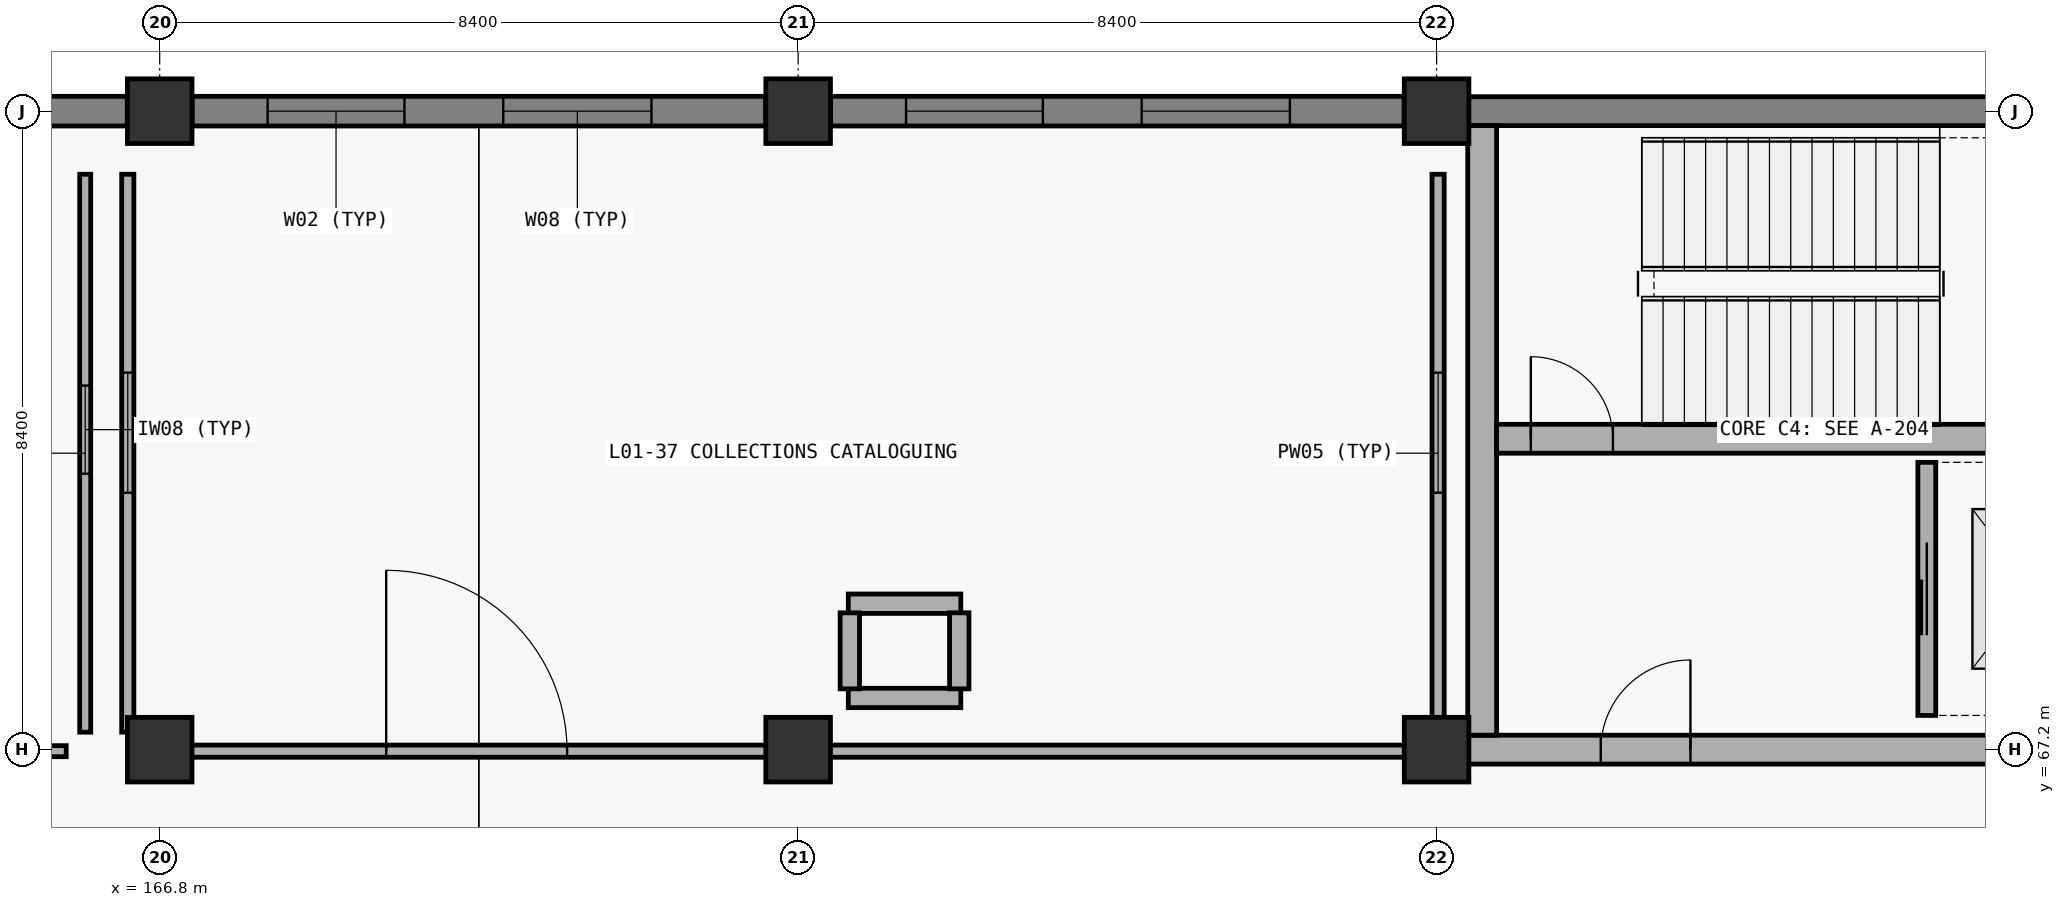
"""IFC4 building model, lengths in metres.
Left out: names, types, materials, properties, quantities, classifications, styles, units other than length and angle.
Written with IfcOpenShell. Run it as: python <this file> out.ifc"""

import sys

from ifc_helpers import new_model, si_unit, direction, frame, frame_2d, origin, origin_2d, place, context, subcontext, project, spatial, rectangle, extrude, element, fill, save


model = new_model("IFC4")
c1 = context("Model", 3, precision=1e-05, world=origin(), true_north=direction((0.0, 1.0)))
c2 = subcontext(c1, "Body", "Model", "MODEL_VIEW")
j1 = project(units=[si_unit("LENGTHUNIT", "METRE"), si_unit("PLANEANGLEUNIT", "RADIAN")], contexts=[c1])
p1 = place(None, origin())
s1 = spatial("IfcSite", under=j1, at=p1, CompositionType="ELEMENT")
p2 = place(p1, origin())
s2 = spatial("IfcBuilding", under=s1, at=p2, CompositionType="ELEMENT")
p3 = place(p2, frame((0.0, 0.0, 5.4)))
s3 = spatial("IfcBuildingStorey", under=s2, at=p3, CompositionType="ELEMENT", Elevation=5.4)
for number, where, z_axis, x_axis in (
    (1, (166.8, 67.2, 0.0), (0.0, 0.0, 1.0), (1.0, 0.0, 0.0)),
    (2, (166.8, 75.6, 0.0), (0.0, 0.0, 1.0), (1.0, 0.0, 0.0)),
    (3, (175.2, 67.2, 0.0), (0.0, 0.0, 1.0), (1.0, 0.0, 0.0)),
    (4, (175.2, 75.6, 0.0), (0.0, 0.0, 1.0), (1.0, 0.0, 0.0)),
    (5, (183.6, 67.2, 0.0), (0.0, 0.0, 1.0), (1.0, 0.0, 0.0)),
    (6, (183.6, 75.6, 0.0), (0.0, 0.0, 1.0), (1.0, 0.0, 0.0)),
):
    element("IfcColumn", number, at=place(p3, frame(where, z_axis=z_axis, x_axis=x_axis)), inside=s3, PredefinedType="COLUMN", context=c2, shape_type="SweptSolid", body=[
        extrude(rectangle(XDim=0.85, YDim=0.85, at=origin_2d()), origin(), (0.0, 0.0, 1.0), 5.1),
    ])
p4 = place(p3, frame((184.01, 67.2, 0.0), z_axis=(0.0, 0.0, 1.0), x_axis=(1.0, 0.0, 0.0)))
e7 = element("IfcWall", 7, at=p4, inside=s3, PredefinedType="SHEAR", context=c2, shape_type="SweptSolid", body=[
    extrude(rectangle(XDim=9.38, YDim=0.38, at=frame_2d((4.69, 0.0))), origin(), (0.0, 0.0, 1.0), 5.1),
])
p5 = place(p4, frame((1.75, 0.0, 0.0)))
e8 = element("IfcOpeningElement", 8, at=p5, cuts=e7, PredefinedType="OPENING", context=c2, shape_type="SweptSolid", body=[
    extrude(rectangle(XDim=1.18, YDim=2.24, at=frame_2d((0.59, 1.12))), frame((0.0, 0.2, 0.0), z_axis=(0.0, -1.0, 0.0), x_axis=(1.0, 0.0, 0.0)), (0.0, 0.0, 1.0), 0.4),
])
p6 = place(p3, frame((184.01, 75.6, 0.0), z_axis=(0.0, 0.0, 1.0), x_axis=(1.0, 0.0, 0.0)))
e9 = element("IfcWall", 9, at=p6, inside=s3, PredefinedType="SHEAR", context=c2, shape_type="SweptSolid", body=[
    extrude(rectangle(XDim=9.38, YDim=0.38, at=frame_2d((4.69, 0.0))), origin(), (0.0, 0.0, 1.0), 5.1),
])
p7 = place(p3, frame((184.2, 67.39, 0.0), z_axis=(0.0, 0.0, 1.0), x_axis=(0.0, 1.0, 0.0)))
e10 = element("IfcWall", 10, at=p7, inside=s3, PredefinedType="SHEAR", context=c2, shape_type="SweptSolid", body=[
    extrude(rectangle(XDim=8.02, YDim=0.38, at=frame_2d((4.01, 0.0))), origin(), (0.0, 0.0, 1.0), 5.1),
])
p8 = place(p3, frame((184.39, 71.29, 0.0), z_axis=(0.0, 0.0, 1.0), x_axis=(1.0, 0.0, 0.0)))
e11 = element("IfcWall", 11, at=p8, inside=s3, PredefinedType="SHEAR", context=c2, shape_type="SweptSolid", body=[
    extrude(rectangle(XDim=8.62, YDim=0.38, at=frame_2d((4.31, 0.0))), origin(), (0.0, 0.0, 1.0), 5.1),
])
p9 = place(p8, frame((0.45, 0.0, 0.0)))
e12 = element("IfcOpeningElement", 12, at=p9, cuts=e11, PredefinedType="OPENING", context=c2, shape_type="SweptSolid", body=[
    extrude(rectangle(XDim=1.08, YDim=2.18, at=frame_2d((0.54, 1.09))), frame((0.0, 0.2, 0.0), z_axis=(0.0, -1.0, 0.0), x_axis=(1.0, 0.0, 0.0)), (0.0, 0.0, 1.0), 0.4),
])
p10 = place(p3, frame((158.827, 75.6, 0.0), z_axis=(0.0, 0.0, 1.0), x_axis=(1.0, 0.0, 0.0)))
e13 = element("IfcWall", 13, at=p10, inside=s3, PredefinedType="SOLIDWALL", context=c2, shape_type="SweptSolid", body=[
    extrude(rectangle(XDim=7.546, YDim=0.39, at=frame_2d((3.773, 0.0))), origin(), (0.0, 0.0, 1.0), 4.07),
])
p11 = place(p10, frame((0.993, 0.0, 0.85)))
e14 = element("IfcOpeningElement", 14, at=p11, cuts=e13, PredefinedType="OPENING", context=c2, shape_type="SweptSolid", body=[
    extrude(rectangle(XDim=1.8, YDim=2.5, at=frame_2d((0.9, 1.25))), frame((0.0, 0.205, 0.0), z_axis=(0.0, -1.0, 0.0), x_axis=(1.0, 0.0, 0.0)), (0.0, 0.0, 1.0), 0.41),
])
p12 = place(p10, frame((4.093, 0.0, 0.85)))
e15 = element("IfcOpeningElement", 15, at=p12, cuts=e13, PredefinedType="OPENING", context=c2, shape_type="SweptSolid", body=[
    extrude(rectangle(XDim=1.95, YDim=2.3, at=frame_2d((0.975, 1.15))), frame((0.0, 0.205, 0.0), z_axis=(0.0, -1.0, 0.0), x_axis=(1.0, 0.0, 0.0)), (0.0, 0.0, 1.0), 0.41),
])
p13 = place(p3, frame((167.227, 75.6, 0.0), z_axis=(0.0, 0.0, 1.0), x_axis=(1.0, 0.0, 0.0)))
e16 = element("IfcWall", 16, at=p13, inside=s3, PredefinedType="SOLIDWALL", context=c2, shape_type="SweptSolid", body=[
    extrude(rectangle(XDim=7.546, YDim=0.39, at=frame_2d((3.773, 0.0))), origin(), (0.0, 0.0, 1.0), 4.32),
])
p14 = place(p13, frame((0.993, 0.0, 0.85)))
e17 = element("IfcOpeningElement", 17, at=p14, cuts=e16, PredefinedType="OPENING", context=c2, shape_type="SweptSolid", body=[
    extrude(rectangle(XDim=1.8, YDim=2.5, at=frame_2d((0.9, 1.25))), frame((0.0, 0.205, 0.0), z_axis=(0.0, -1.0, 0.0), x_axis=(1.0, 0.0, 0.0)), (0.0, 0.0, 1.0), 0.41),
])
p15 = place(p13, frame((4.093, 0.0, 0.85)))
e18 = element("IfcOpeningElement", 18, at=p15, cuts=e16, PredefinedType="OPENING", context=c2, shape_type="SweptSolid", body=[
    extrude(rectangle(XDim=1.95, YDim=2.3, at=frame_2d((0.975, 1.15))), frame((0.0, 0.205, 0.0), z_axis=(0.0, -1.0, 0.0), x_axis=(1.0, 0.0, 0.0)), (0.0, 0.0, 1.0), 0.41),
])
p16 = place(p3, frame((175.627, 75.6, 0.0), z_axis=(0.0, 0.0, 1.0), x_axis=(1.0, 0.0, 0.0)))
e19 = element("IfcWall", 19, at=p16, inside=s3, PredefinedType="SOLIDWALL", context=c2, shape_type="SweptSolid", body=[
    extrude(rectangle(XDim=7.546, YDim=0.39, at=frame_2d((3.773, 0.0))), origin(), (0.0, 0.0, 1.0), 4.07),
])
p17 = place(p16, frame((0.993, 0.0, 0.85)))
e20 = element("IfcOpeningElement", 20, at=p17, cuts=e19, PredefinedType="OPENING", context=c2, shape_type="SweptSolid", body=[
    extrude(rectangle(XDim=1.8, YDim=2.5, at=frame_2d((0.9, 1.25))), frame((0.0, 0.205, 0.0), z_axis=(0.0, -1.0, 0.0), x_axis=(1.0, 0.0, 0.0)), (0.0, 0.0, 1.0), 0.41),
])
p18 = place(p16, frame((4.093, 0.0, 0.85)))
e21 = element("IfcOpeningElement", 21, at=p18, cuts=e19, PredefinedType="OPENING", context=c2, shape_type="SweptSolid", body=[
    extrude(rectangle(XDim=1.95, YDim=2.3, at=frame_2d((0.975, 1.15))), frame((0.0, 0.205, 0.0), z_axis=(0.0, -1.0, 0.0), x_axis=(1.0, 0.0, 0.0)), (0.0, 0.0, 1.0), 0.41),
])
p19 = place(p3, frame((190.05, 67.65, 0.0), z_axis=(0.0, 0.0, 1.0), x_axis=(0.0, 1.0, 0.0)))
e22 = element("IfcWall", 22, at=p19, inside=s3, PredefinedType="PARTITIONING", context=c2, shape_type="SweptSolid", body=[
    extrude(rectangle(XDim=3.33, YDim=0.235, at=frame_2d((1.665, 0.0))), origin(), (0.0, 0.0, 1.0), 4.72),
])
p20 = place(p19, frame((1.055, 0.0, 0.0)))
e23 = element("IfcOpeningElement", 23, at=p20, cuts=e22, PredefinedType="OPENING", context=c2, shape_type="SweptSolid", body=[
    extrude(rectangle(XDim=1.22, YDim=2.24, at=frame_2d((0.61, 1.12))), frame((0.0, 0.127, 0.0), z_axis=(0.0, -1.0, 0.0), x_axis=(1.0, 0.0, 0.0)), (0.0, 0.0, 1.0), 0.255),
])
for number, where, z_axis, x_axis in (
    (24, (175.86, 69.12, 0.0), (0.0, 0.0, 1.0), (1.0, 0.0, 0.0)),
    (25, (175.86, 67.88, 0.0), (0.0, 0.0, 1.0), (1.0, 0.0, 0.0)),
):
    element("IfcWall", number, at=place(p3, frame(where, z_axis=z_axis, x_axis=x_axis)), inside=s3, PredefinedType="PARTITIONING", context=c2, shape_type="SweptSolid", body=[
        extrude(rectangle(XDim=1.48, YDim=0.255, at=frame_2d((0.74, 0.0))), origin(), (0.0, 0.0, 1.0), 4.72),
    ])
for number, where, z_axis, x_axis in (
    (26, (175.88, 68.0, 0.0), (0.0, 0.0, 1.0), (0.0, 1.0, 0.0)),
    (27, (177.32, 68.0, 0.0), (0.0, 0.0, 1.0), (0.0, 1.0, 0.0)),
):
    element("IfcWall", number, at=place(p3, frame(where, z_axis=z_axis, x_axis=x_axis)), inside=s3, PredefinedType="PARTITIONING", context=c2, shape_type="SweptSolid", body=[
        extrude(rectangle(XDim=1.0, YDim=0.255, at=frame_2d((0.5, 0.0))), origin(), (0.0, 0.0, 1.0), 4.72),
    ])
p21 = place(p3, frame((142.43, 67.18, 0.0), z_axis=(0.0, 0.0, 1.0), x_axis=(1.0, 0.0, 0.0)))
e28 = element("IfcWall", 28, at=p21, inside=s3, PredefinedType="PARTITIONING", context=c2, shape_type="SweptSolid", body=[
    extrude(rectangle(XDim=23.14, YDim=0.145, at=frame_2d((11.57, 0.0))), origin(), (0.0, 0.0, 1.0), 3.77),
])
p22 = place(p21, frame((18.9, 0.0, 0.0)))
e29 = element("IfcOpeningElement", 29, at=p22, cuts=e28, PredefinedType="OPENING", context=c2, shape_type="SweptSolid", body=[
    extrude(rectangle(XDim=2.52, YDim=2.8, at=frame_2d((1.26, 1.4))), frame((0.0, 0.083, 0.0), z_axis=(0.0, -1.0, 0.0), x_axis=(1.0, 0.0, 0.0)), (0.0, 0.0, 1.0), 0.165),
])
p23 = place(p3, frame((165.82, 67.43, 0.0), z_axis=(0.0, 0.0, 1.0), x_axis=(0.0, 1.0, 0.0)))
e30 = element("IfcWall", 30, at=p23, inside=s3, PredefinedType="PARTITIONING", context=c2, shape_type="SweptSolid", body=[
    extrude(rectangle(XDim=7.34, YDim=0.145, at=frame_2d((3.67, 0.0))), origin(), (0.0, 0.0, 1.0), 4.175),
])
p24 = place(p23, frame((3.4, 0.0, 0.9)))
e31 = element("IfcOpeningElement", 31, at=p24, cuts=e30, PredefinedType="OPENING", context=c2, shape_type="SweptSolid", body=[
    extrude(rectangle(XDim=1.16, YDim=1.62, at=frame_2d((0.58, 0.81))), frame((0.0, 0.083, 0.0), z_axis=(0.0, -1.0, 0.0), x_axis=(1.0, 0.0, 0.0)), (0.0, 0.0, 1.0), 0.165),
])
p25 = place(p3, frame((166.63, 67.18, 0.0), z_axis=(0.0, 0.0, 1.0), x_axis=(1.0, 0.0, 0.0)))
e32 = element("IfcWall", 32, at=p25, inside=s3, PredefinedType="PARTITIONING", context=c2, shape_type="SweptSolid", body=[
    extrude(rectangle(XDim=16.74, YDim=0.16, at=frame_2d((8.37, 0.0))), origin(), (0.0, 0.0, 1.0), 3.77),
])
p26 = place(p25, frame((3.15, 0.0, 0.0)))
e33 = element("IfcOpeningElement", 33, at=p26, cuts=e32, PredefinedType="OPENING", context=c2, shape_type="SweptSolid", body=[
    extrude(rectangle(XDim=2.38, YDim=2.74, at=frame_2d((1.19, 1.37))), frame((0.0, 0.09, 0.0), z_axis=(0.0, -1.0, 0.0), x_axis=(1.0, 0.0, 0.0)), (0.0, 0.0, 1.0), 0.18),
])
p27 = place(p3, frame((166.38, 67.43, 0.0), z_axis=(0.0, 0.0, 1.0), x_axis=(0.0, 1.0, 0.0)))
e34 = element("IfcWall", 34, at=p27, inside=s3, PredefinedType="PARTITIONING", context=c2, shape_type="SweptSolid", body=[
    extrude(rectangle(XDim=7.34, YDim=0.16, at=frame_2d((3.67, 0.0))), origin(), (0.0, 0.0, 1.0), 4.175),
])
p28 = place(p27, frame((3.15, 0.0, 0.9)))
e35 = element("IfcOpeningElement", 35, at=p28, cuts=e34, PredefinedType="OPENING", context=c2, shape_type="SweptSolid", body=[
    extrude(rectangle(XDim=1.58, YDim=1.24, at=frame_2d((0.79, 0.62))), frame((0.0, 0.09, 0.0), z_axis=(0.0, -1.0, 0.0), x_axis=(1.0, 0.0, 0.0)), (0.0, 0.0, 1.0), 0.18),
])
p29 = place(p3, frame((183.62, 67.43, 0.0), z_axis=(0.0, 0.0, 1.0), x_axis=(0.0, 1.0, 0.0)))
e36 = element("IfcWall", 36, at=p29, inside=s3, PredefinedType="PARTITIONING", context=c2, shape_type="SweptSolid", body=[
    extrude(rectangle(XDim=7.34, YDim=0.16, at=frame_2d((3.67, 0.0))), origin(), (0.0, 0.0, 1.0), 4.075),
])
p30 = place(p29, frame((3.15, 0.0, 0.9)))
e37 = element("IfcOpeningElement", 37, at=p30, cuts=e36, PredefinedType="OPENING", context=c2, shape_type="SweptSolid", body=[
    extrude(rectangle(XDim=1.58, YDim=1.24, at=frame_2d((0.79, 0.62))), frame((0.0, 0.09, 0.0), z_axis=(0.0, -1.0, 0.0), x_axis=(1.0, 0.0, 0.0)), (0.0, 0.0, 1.0), 0.18),
])
p31 = place(p14, origin())
e38 = element("IfcWindow", 38, at=p31, inside=s3, PartitioningType="SINGLE_PANEL", PredefinedType="WINDOW", context=c2, shape_type="SweptSolid", body=[
    extrude(rectangle(XDim=1.8, YDim=2.5, at=frame_2d((0.9, 1.25))), frame((0.0, 0.03, 0.0), z_axis=(0.0, -1.0, 0.0), x_axis=(1.0, 0.0, 0.0)), (0.0, 0.0, 1.0), 0.06),
])
fill(e17, e38)
p32 = place(p15, origin())
e39 = element("IfcWindow", 39, at=p32, inside=s3, PartitioningType="SINGLE_PANEL", PredefinedType="WINDOW", context=c2, shape_type="SweptSolid", body=[
    extrude(rectangle(XDim=1.95, YDim=2.3, at=frame_2d((0.975, 1.15))), frame((0.0, 0.03, 0.0), z_axis=(0.0, -1.0, 0.0), x_axis=(1.0, 0.0, 0.0)), (0.0, 0.0, 1.0), 0.06),
])
fill(e18, e39)
p33 = place(p17, origin())
e40 = element("IfcWindow", 40, at=p33, inside=s3, PartitioningType="SINGLE_PANEL", PredefinedType="WINDOW", context=c2, shape_type="SweptSolid", body=[
    extrude(rectangle(XDim=1.8, YDim=2.5, at=frame_2d((0.9, 1.25))), frame((0.0, 0.03, 0.0), z_axis=(0.0, -1.0, 0.0), x_axis=(1.0, 0.0, 0.0)), (0.0, 0.0, 1.0), 0.06),
])
fill(e20, e40)
p34 = place(p18, origin())
e41 = element("IfcWindow", 41, at=p34, inside=s3, PartitioningType="SINGLE_PANEL", PredefinedType="WINDOW", context=c2, shape_type="SweptSolid", body=[
    extrude(rectangle(XDim=1.95, YDim=2.3, at=frame_2d((0.975, 1.15))), frame((0.0, 0.03, 0.0), z_axis=(0.0, -1.0, 0.0), x_axis=(1.0, 0.0, 0.0)), (0.0, 0.0, 1.0), 0.06),
])
fill(e21, e41)
p35 = place(p9, origin())
e42 = element("IfcDoor", 42, at=p35, inside=s3, OperationType="SINGLE_SWING_LEFT", PredefinedType="DOOR", context=c2, shape_type="SweptSolid", body=[
    extrude(rectangle(XDim=1.08, YDim=2.18, at=frame_2d((0.54, 1.09))), frame((0.0, 0.025, 0.0), z_axis=(0.0, -1.0, 0.0), x_axis=(1.0, 0.0, 0.0)), (0.0, 0.0, 1.0), 0.05),
])
fill(e12, e42)
p36 = place(p5, origin())
e43 = element("IfcDoor", 43, at=p36, inside=s3, OperationType="SINGLE_SWING_RIGHT", PredefinedType="DOOR", context=c2, shape_type="SweptSolid", body=[
    extrude(rectangle(XDim=1.18, YDim=2.24, at=frame_2d((0.59, 1.12))), frame((0.0, 0.025, 0.0), z_axis=(0.0, -1.0, 0.0), x_axis=(1.0, 0.0, 0.0)), (0.0, 0.0, 1.0), 0.05),
])
fill(e8, e43)
p37 = place(p20, origin())
e44 = element("IfcDoor", 44, at=p37, inside=s3, OperationType="SLIDING_TO_RIGHT", PredefinedType="DOOR", context=c2, shape_type="SweptSolid", body=[
    extrude(rectangle(XDim=1.22, YDim=2.24, at=frame_2d((0.61, 1.12))), frame((0.0, 0.025, 0.0), z_axis=(0.0, -1.0, 0.0), x_axis=(1.0, 0.0, 0.0)), (0.0, 0.0, 1.0), 0.05),
])
fill(e23, e44)
p38 = place(p24, origin())
e45 = element("IfcWindow", 45, at=p38, inside=s3, PartitioningType="SINGLE_PANEL", PredefinedType="WINDOW", context=c2, shape_type="SweptSolid", body=[
    extrude(rectangle(XDim=1.16, YDim=1.62, at=frame_2d((0.58, 0.81))), frame((0.0, 0.03, 0.0), z_axis=(0.0, -1.0, 0.0), x_axis=(1.0, 0.0, 0.0)), (0.0, 0.0, 1.0), 0.06),
])
fill(e31, e45)
p39 = place(p26, origin())
e46 = element("IfcDoor", 46, at=p39, inside=s3, OperationType="DOUBLE_SWING_LEFT", PredefinedType="GATE", context=c2, shape_type="SweptSolid", body=[
    extrude(rectangle(XDim=2.38, YDim=2.74, at=frame_2d((1.19, 1.37))), frame((0.0, 0.025, 0.0), z_axis=(0.0, -1.0, 0.0), x_axis=(1.0, 0.0, 0.0)), (0.0, 0.0, 1.0), 0.05),
])
fill(e33, e46)
p40 = place(p28, origin())
e47 = element("IfcWindow", 47, at=p40, inside=s3, PartitioningType="SINGLE_PANEL", PredefinedType="WINDOW", context=c2, shape_type="SweptSolid", body=[
    extrude(rectangle(XDim=1.58, YDim=1.24, at=frame_2d((0.79, 0.62))), frame((0.0, 0.03, 0.0), z_axis=(0.0, -1.0, 0.0), x_axis=(1.0, 0.0, 0.0)), (0.0, 0.0, 1.0), 0.06),
])
fill(e35, e47)
p41 = place(p30, origin())
e48 = element("IfcWindow", 48, at=p41, inside=s3, PartitioningType="SINGLE_PANEL", PredefinedType="WINDOW", context=c2, shape_type="SweptSolid", body=[
    extrude(rectangle(XDim=1.58, YDim=1.24, at=frame_2d((0.79, 0.62))), frame((0.0, 0.03, 0.0), z_axis=(0.0, -1.0, 0.0), x_axis=(1.0, 0.0, 0.0)), (0.0, 0.0, 1.0), 0.06),
])
fill(e37, e48)
save(model, sys.argv[1])
